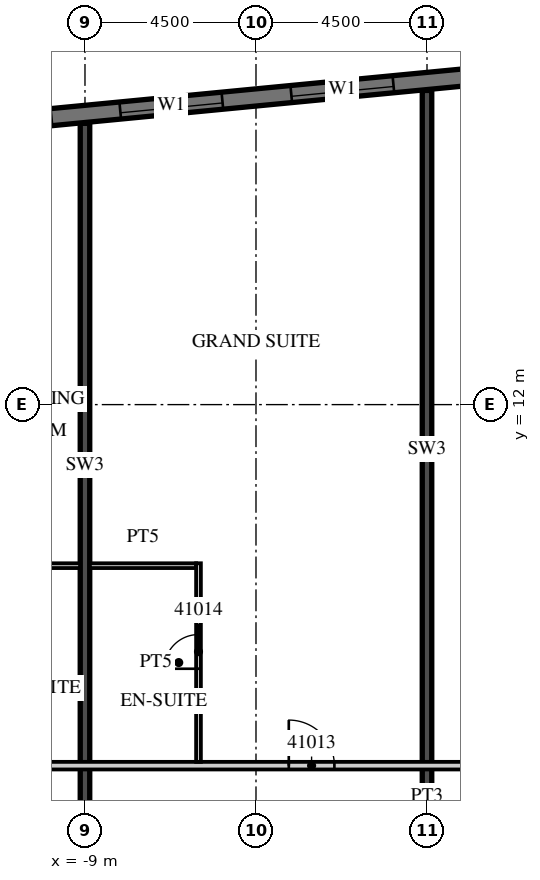
"""IFC4 building model, lengths in metres.
Left out: names, types, materials, properties, quantities, classifications, styles, units other than length and angle.
Written with IfcOpenShell. Run it as: python <this file> out.ifc"""

import sys

from ifc_helpers import new_model, si_unit, direction, frame, frame_2d, origin, place, context, subcontext, project, spatial, rectangle, extrude, element, fill, save


model = new_model("IFC4")
c1 = context("Model", 3, precision=1e-05, world=origin(), true_north=direction((0.0, 1.0)))
c2 = subcontext(c1, "Body", "Model", "MODEL_VIEW")
j1 = project(units=[si_unit("LENGTHUNIT", "METRE"), si_unit("PLANEANGLEUNIT", "RADIAN")], contexts=[c1])
p1 = place(None, origin())
s1 = spatial("IfcSite", under=j1, at=p1, CompositionType="ELEMENT")
p2 = place(p1, origin())
s2 = spatial("IfcBuilding", under=s1, at=p2, CompositionType="ELEMENT")
p3 = place(p2, frame((0.0, 0.0, 176.8)))
s3 = spatial("IfcBuildingStorey", under=s2, at=p3, CompositionType="ELEMENT", Elevation=176.8)
p4 = place(p3, frame((-9.0, 1.4, 0.0), z_axis=(0.0, 0.0, 1.0), x_axis=(0.0, 1.0, 0.0)))
e1 = element("IfcWall", 1, at=p4, inside=s3, PredefinedType="SHEAR", context=c2, shape_type="SweptSolid", body=[
    extrude(rectangle(XDim=18.001, YDim=0.25, at=frame_2d((9.0, 0.0))), origin(), (0.0, 0.0, 1.0), 3.3),
])
p5 = place(p3, frame((0.0, 1.4, 0.0), z_axis=(0.0, 0.0, 1.0), x_axis=(0.0, 1.0, 0.0)))
e2 = element("IfcWall", 2, at=p5, inside=s3, PredefinedType="SHEAR", context=c2, shape_type="SweptSolid", body=[
    extrude(rectangle(XDim=18.867, YDim=0.25, at=frame_2d((9.434, 0.0))), origin(), (0.0, 0.0, 1.0), 3.3),
])
p6 = place(p3, frame((13.521, 21.817, 0.0), z_axis=(0.0, 0.0, 1.0), x_axis=(-0.995396508751, -0.095842529008, 0.0)))
e3 = element("IfcWall", 3, at=p6, inside=s3, PredefinedType="SOLIDWALL", context=c2, shape_type="SweptSolid", body=[
    extrude(rectangle(XDim=54.591, YDim=0.45, at=frame_2d((27.296, 0.0))), origin(), (0.0, 0.0, 1.0), 3.02),
])
p7 = place(p6, frame((0.91, 0.0, 0.45)))
e4 = element("IfcOpeningElement", 4, at=p7, cuts=e3, PredefinedType="OPENING", context=c2, shape_type="SweptSolid", body=[
    extrude(rectangle(XDim=2.7, YDim=2.25, at=frame_2d((1.35, 1.125))), frame((0.0, 0.235, 0.0), z_axis=(0.0, -1.0, 0.0), x_axis=(1.0, 0.0, 0.0)), (0.0, 0.0, 1.0), 0.47),
])
p8 = place(p6, frame((5.431, 0.0, 0.45)))
e5 = element("IfcOpeningElement", 5, at=p8, cuts=e3, PredefinedType="OPENING", context=c2, shape_type="SweptSolid", body=[
    extrude(rectangle(XDim=2.7, YDim=2.25, at=frame_2d((1.35, 1.125))), frame((0.0, 0.235, 0.0), z_axis=(0.0, -1.0, 0.0), x_axis=(1.0, 0.0, 0.0)), (0.0, 0.0, 1.0), 0.47),
])
p9 = place(p6, frame((9.952, 0.0, 0.45)))
e6 = element("IfcOpeningElement", 6, at=p9, cuts=e3, PredefinedType="OPENING", context=c2, shape_type="SweptSolid", body=[
    extrude(rectangle(XDim=2.7, YDim=2.25, at=frame_2d((1.35, 1.125))), frame((0.0, 0.235, 0.0), z_axis=(0.0, -1.0, 0.0), x_axis=(1.0, 0.0, 0.0)), (0.0, 0.0, 1.0), 0.47),
])
p10 = place(p6, frame((14.473, 0.0, 0.45)))
e7 = element("IfcOpeningElement", 7, at=p10, cuts=e3, PredefinedType="OPENING", context=c2, shape_type="SweptSolid", body=[
    extrude(rectangle(XDim=2.7, YDim=2.25, at=frame_2d((1.35, 1.125))), frame((0.0, 0.235, 0.0), z_axis=(0.0, -1.0, 0.0), x_axis=(1.0, 0.0, 0.0)), (0.0, 0.0, 1.0), 0.47),
])
p11 = place(p6, frame((18.994, 0.0, 0.45)))
e8 = element("IfcOpeningElement", 8, at=p11, cuts=e3, PredefinedType="OPENING", context=c2, shape_type="SweptSolid", body=[
    extrude(rectangle(XDim=2.7, YDim=2.25, at=frame_2d((1.35, 1.125))), frame((0.0, 0.235, 0.0), z_axis=(0.0, -1.0, 0.0), x_axis=(1.0, 0.0, 0.0)), (0.0, 0.0, 1.0), 0.47),
])
p12 = place(p6, frame((23.514, 0.0, 0.45)))
e9 = element("IfcOpeningElement", 9, at=p12, cuts=e3, PredefinedType="OPENING", context=c2, shape_type="SweptSolid", body=[
    extrude(rectangle(XDim=2.7, YDim=2.25, at=frame_2d((1.35, 1.125))), frame((0.0, 0.235, 0.0), z_axis=(0.0, -1.0, 0.0), x_axis=(1.0, 0.0, 0.0)), (0.0, 0.0, 1.0), 0.47),
])
p13 = place(p6, frame((28.035, 0.0, 0.45)))
e10 = element("IfcOpeningElement", 10, at=p13, cuts=e3, PredefinedType="OPENING", context=c2, shape_type="SweptSolid", body=[
    extrude(rectangle(XDim=2.7, YDim=2.25, at=frame_2d((1.35, 1.125))), frame((0.0, 0.235, 0.0), z_axis=(0.0, -1.0, 0.0), x_axis=(1.0, 0.0, 0.0)), (0.0, 0.0, 1.0), 0.47),
])
p14 = place(p6, frame((32.556, 0.0, 0.45)))
e11 = element("IfcOpeningElement", 11, at=p14, cuts=e3, PredefinedType="OPENING", context=c2, shape_type="SweptSolid", body=[
    extrude(rectangle(XDim=2.7, YDim=2.25, at=frame_2d((1.35, 1.125))), frame((0.0, 0.235, 0.0), z_axis=(0.0, -1.0, 0.0), x_axis=(1.0, 0.0, 0.0)), (0.0, 0.0, 1.0), 0.47),
])
p15 = place(p6, frame((37.077, 0.0, 0.45)))
e12 = element("IfcOpeningElement", 12, at=p15, cuts=e3, PredefinedType="OPENING", context=c2, shape_type="SweptSolid", body=[
    extrude(rectangle(XDim=2.7, YDim=2.25, at=frame_2d((1.35, 1.125))), frame((0.0, 0.235, 0.0), z_axis=(0.0, -1.0, 0.0), x_axis=(1.0, 0.0, 0.0)), (0.0, 0.0, 1.0), 0.47),
])
p16 = place(p6, frame((41.598, 0.0, 0.45)))
e13 = element("IfcOpeningElement", 13, at=p16, cuts=e3, PredefinedType="OPENING", context=c2, shape_type="SweptSolid", body=[
    extrude(rectangle(XDim=2.7, YDim=2.25, at=frame_2d((1.35, 1.125))), frame((0.0, 0.235, 0.0), z_axis=(0.0, -1.0, 0.0), x_axis=(1.0, 0.0, 0.0)), (0.0, 0.0, 1.0), 0.47),
])
p17 = place(p6, frame((46.118, 0.0, 0.45)))
e14 = element("IfcOpeningElement", 14, at=p17, cuts=e3, PredefinedType="OPENING", context=c2, shape_type="SweptSolid", body=[
    extrude(rectangle(XDim=2.7, YDim=2.25, at=frame_2d((1.35, 1.125))), frame((0.0, 0.235, 0.0), z_axis=(0.0, -1.0, 0.0), x_axis=(1.0, 0.0, 0.0)), (0.0, 0.0, 1.0), 0.47),
])
p18 = place(p6, frame((50.629, 0.0, 0.45)))
e15 = element("IfcOpeningElement", 15, at=p18, cuts=e3, PredefinedType="OPENING", context=c2, shape_type="SweptSolid", body=[
    extrude(rectangle(XDim=2.7, YDim=2.25, at=frame_2d((1.35, 1.125))), frame((0.0, 0.235, 0.0), z_axis=(0.0, -1.0, 0.0), x_axis=(1.0, 0.0, 0.0)), (0.0, 0.0, 1.0), 0.47),
])
p19 = place(p3, frame((-13.5, 2.5, 0.0), z_axis=(0.0, 0.0, 1.0), x_axis=(1.0, 0.0, 0.0)))
e16 = element("IfcWall", 16, at=p19, inside=s3, PredefinedType="PARTITIONING", context=c2, shape_type="SweptSolid", body=[
    extrude(rectangle(XDim=27.0, YDim=0.2, at=frame_2d((13.5, 0.0))), origin(), (0.0, 0.0, 1.0), 3.02),
])
p20 = place(p19, frame((0.575, 0.0, 0.0)))
e17 = element("IfcOpeningElement", 17, at=p20, cuts=e16, PredefinedType="OPENING", context=c2, shape_type="SweptSolid", body=[
    extrude(rectangle(XDim=1.0, YDim=2.1, at=frame_2d((0.5, 1.05))), frame((0.0, 0.11, 0.0), z_axis=(0.0, -1.0, 0.0), x_axis=(1.0, 0.0, 0.0)), (0.0, 0.0, 1.0), 0.22),
])
p21 = place(p19, frame((9.863, 0.0, 0.0)))
e18 = element("IfcOpeningElement", 18, at=p21, cuts=e16, PredefinedType="OPENING", context=c2, shape_type="SweptSolid", body=[
    extrude(rectangle(XDim=1.2, YDim=2.1, at=frame_2d((0.6, 1.05))), frame((0.0, 0.11, 0.0), z_axis=(0.0, -1.0, 0.0), x_axis=(1.0, 0.0, 0.0)), (0.0, 0.0, 1.0), 0.22),
])
p22 = place(p19, frame((15.938, 0.0, 0.0)))
e19 = element("IfcOpeningElement", 19, at=p22, cuts=e16, PredefinedType="OPENING", context=c2, shape_type="SweptSolid", body=[
    extrude(rectangle(XDim=1.2, YDim=2.1, at=frame_2d((0.6, 1.05))), frame((0.0, 0.11, 0.0), z_axis=(0.0, -1.0, 0.0), x_axis=(1.0, 0.0, 0.0)), (0.0, 0.0, 1.0), 0.22),
])
p23 = place(p19, frame((25.425, 0.0, 0.0)))
e20 = element("IfcOpeningElement", 20, at=p23, cuts=e16, PredefinedType="OPENING", context=c2, shape_type="SweptSolid", body=[
    extrude(rectangle(XDim=1.0, YDim=2.1, at=frame_2d((0.5, 1.05))), frame((0.0, 0.11, 0.0), z_axis=(0.0, -1.0, 0.0), x_axis=(1.0, 0.0, 0.0)), (0.0, 0.0, 1.0), 0.22),
])
p24 = place(p3, frame((-11.375, 7.762, 0.0), z_axis=(0.0, 0.0, 1.0), x_axis=(1.0, 0.0, 0.0)))
e21 = element("IfcWall", 21, at=p24, inside=s3, PredefinedType="PARTITIONING", context=c2, shape_type="SweptSolid", body=[
    extrude(rectangle(XDim=2.25, YDim=0.125, at=frame_2d((1.125, 0.0))), origin(), (0.0, 0.0, 1.0), 3.02),
])
p25 = place(p3, frame((-6.013, 2.6, 0.0), z_axis=(0.0, 0.0, 1.0), x_axis=(0.0, 1.0, 0.0)))
e22 = element("IfcWall", 22, at=p25, inside=s3, PredefinedType="PARTITIONING", context=c2, shape_type="SweptSolid", body=[
    extrude(rectangle(XDim=5.225, YDim=0.125, at=frame_2d((2.612, 0.0))), origin(), (0.0, 0.0, 1.0), 3.02),
])
p26 = place(p25, frame((2.45, 0.0, 0.0)))
e23 = element("IfcOpeningElement", 23, at=p26, cuts=e22, PredefinedType="OPENING", context=c2, shape_type="SweptSolid", body=[
    extrude(rectangle(XDim=0.9, YDim=2.1, at=frame_2d((0.45, 1.05))), frame((0.0, 0.073, 0.0), z_axis=(0.0, -1.0, 0.0), x_axis=(1.0, 0.0, 0.0)), (0.0, 0.0, 1.0), 0.145),
])
p27 = place(p3, frame((-8.875, 7.762, 0.0), z_axis=(0.0, 0.0, 1.0), x_axis=(1.0, 0.0, 0.0)))
e24 = element("IfcWall", 24, at=p27, inside=s3, PredefinedType="PARTITIONING", context=c2, shape_type="SweptSolid", body=[
    extrude(rectangle(XDim=2.8, YDim=0.125, at=frame_2d((1.4, 0.0))), origin(), (0.0, 0.0, 1.0), 3.02),
])
p28 = place(p10, origin())
e25 = element("IfcWindow", 25, at=p28, inside=s3, PartitioningType="SINGLE_PANEL", PredefinedType="WINDOW", context=c2, shape_type="SweptSolid", body=[
    extrude(rectangle(XDim=2.7, YDim=2.25, at=frame_2d((1.35, 1.125))), frame((0.0, 0.09, 0.0), z_axis=(0.0, -1.0, 0.0), x_axis=(1.0, 0.0, 0.0)), (0.0, 0.0, 1.0), 0.06),
])
fill(e7, e25)
p29 = place(p11, origin())
e26 = element("IfcWindow", 26, at=p29, inside=s3, PartitioningType="SINGLE_PANEL", PredefinedType="WINDOW", context=c2, shape_type="SweptSolid", body=[
    extrude(rectangle(XDim=2.7, YDim=2.25, at=frame_2d((1.35, 1.125))), frame((0.0, 0.09, 0.0), z_axis=(0.0, -1.0, 0.0), x_axis=(1.0, 0.0, 0.0)), (0.0, 0.0, 1.0), 0.06),
])
fill(e8, e26)
p30 = place(p21, origin())
e27 = element("IfcDoor", 27, at=p30, inside=s3, OperationType="SINGLE_SWING_LEFT", PredefinedType="DOOR", context=c2, shape_type="SweptSolid", body=[
    extrude(rectangle(XDim=1.2, YDim=2.1, at=frame_2d((0.6, 1.05))), frame((0.0, 0.025, 0.0), z_axis=(0.0, -1.0, 0.0), x_axis=(1.0, 0.0, 0.0)), (0.0, 0.0, 1.0), 0.05),
])
fill(e18, e27)
p31 = place(p26, origin())
e28 = element("IfcDoor", 28, at=p31, inside=s3, OperationType="SINGLE_SWING_LEFT", PredefinedType="DOOR", context=c2, shape_type="SweptSolid", body=[
    extrude(rectangle(XDim=0.9, YDim=2.1, at=frame_2d((0.45, 1.05))), frame((0.0, 0.025, 0.0), z_axis=(0.0, -1.0, 0.0), x_axis=(1.0, 0.0, 0.0)), (0.0, 0.0, 1.0), 0.05),
])
fill(e23, e28)
save(model, sys.argv[1])
